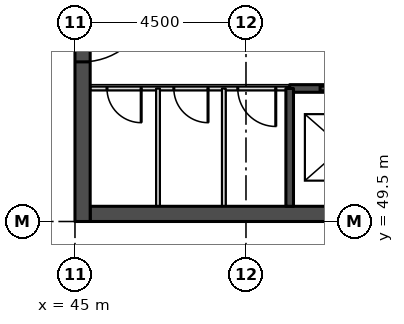
"""IFC4 building model, lengths in metres.
Left out: names, types, materials, properties, quantities, classifications, styles, units other than length and angle.
Written with IfcOpenShell. Run it as: python <this file> out.ifc"""

import sys

from ifc_helpers import new_model, si_unit, direction, frame, frame_2d, origin, place, context, subcontext, project, spatial, rectangle, extrude, element, fill, save


model = new_model("IFC4")
c1 = context("Model", 3, precision=1e-05, world=origin(), true_north=direction((0.0, 1.0)))
c2 = subcontext(c1, "Body", "Model", "MODEL_VIEW")
j1 = project(units=[si_unit("LENGTHUNIT", "METRE"), si_unit("PLANEANGLEUNIT", "RADIAN")], contexts=[c1])
p1 = place(None, origin())
s1 = spatial("IfcSite", under=j1, at=p1, CompositionType="ELEMENT")
p2 = place(p1, origin())
s2 = spatial("IfcBuilding", under=s1, at=p2, CompositionType="ELEMENT")
p3 = place(p2, frame((0.0, 0.0, 143.1)))
s3 = spatial("IfcBuildingStorey", under=s2, at=p3, CompositionType="ELEMENT", Elevation=143.1)
p4 = place(p3, frame((45.4, 49.7, 0.0), z_axis=(0.0, 0.0, 1.0), x_axis=(1.0, 0.0, 0.0)))
e1 = element("IfcWall", 1, at=p4, inside=s3, PredefinedType="SHEAR", context=c2, shape_type="SweptSolid", body=[
    extrude(rectangle(XDim=21.7, YDim=0.4, at=frame_2d((10.85, 0.0))), origin(), (0.0, 0.0, 1.0), 4.6),
])
p5 = place(p3, frame((45.2, 49.5, 0.0), z_axis=(0.0, 0.0, 1.0), x_axis=(0.0, 1.0, 0.0)))
e2 = element("IfcWall", 2, at=p5, inside=s3, PredefinedType="SHEAR", context=c2, shape_type="SweptSolid", body=[
    extrude(rectangle(XDim=22.5, YDim=0.4, at=frame_2d((11.25, 0.0))), origin(), (0.0, 0.0, 1.0), 4.6),
])
p6 = place(p5, frame((4.2, 0.0, 0.0)))
e3 = element("IfcOpeningElement", 3, at=p6, cuts=e2, PredefinedType="OPENING", context=c2, shape_type="SweptSolid", body=[
    extrude(rectangle(XDim=1.8, YDim=2.1, at=frame_2d((0.9, 1.05))), frame((0.0, 0.21, 0.0), z_axis=(0.0, -1.0, 0.0), x_axis=(1.0, 0.0, 0.0)), (0.0, 0.0, 1.0), 0.42),
])
p7 = place(p5, frame((6.9, 0.0, 0.0)))
e4 = element("IfcOpeningElement", 4, at=p7, cuts=e2, PredefinedType="OPENING", context=c2, shape_type="SweptSolid", body=[
    extrude(rectangle(XDim=1.1, YDim=2.1, at=frame_2d((0.55, 1.05))), frame((0.0, 0.21, 0.0), z_axis=(0.0, -1.0, 0.0), x_axis=(1.0, 0.0, 0.0)), (0.0, 0.0, 1.0), 0.42),
])
p8 = place(p5, frame((13.6, 0.0, 0.0)))
e5 = element("IfcOpeningElement", 5, at=p8, cuts=e2, PredefinedType="OPENING", context=c2, shape_type="SweptSolid", body=[
    extrude(rectangle(XDim=1.1, YDim=2.1, at=frame_2d((0.55, 1.05))), frame((0.0, 0.21, 0.0), z_axis=(0.0, -1.0, 0.0), x_axis=(1.0, 0.0, 0.0)), (0.0, 0.0, 1.0), 0.42),
])
p9 = place(p5, frame((16.5, 0.0, 0.0)))
e6 = element("IfcOpeningElement", 6, at=p9, cuts=e2, PredefinedType="OPENING", context=c2, shape_type="SweptSolid", body=[
    extrude(rectangle(XDim=1.8, YDim=2.1, at=frame_2d((0.9, 1.05))), frame((0.0, 0.21, 0.0), z_axis=(0.0, -1.0, 0.0), x_axis=(1.0, 0.0, 0.0)), (0.0, 0.0, 1.0), 0.42),
])
p10 = place(p3, frame((45.4, 53.0, 0.0), z_axis=(0.0, 0.0, 1.0), x_axis=(1.0, 0.0, 0.0)))
e7 = element("IfcWall", 7, at=p10, inside=s3, PredefinedType="PARTITIONING", context=c2, shape_type="SweptSolid", body=[
    extrude(rectangle(XDim=5.25, YDim=0.1, at=frame_2d((2.625, 0.0))), origin(), (0.0, 0.0, 1.0), 4.45),
])
p11 = place(p10, frame((0.442, 0.0, 0.0)))
e8 = element("IfcOpeningElement", 8, at=p11, cuts=e7, PredefinedType="OPENING", context=c2, shape_type="SweptSolid", body=[
    extrude(rectangle(XDim=0.9, YDim=2.1, at=frame_2d((0.45, 1.05))), frame((0.0, 0.06, 0.0), z_axis=(0.0, -1.0, 0.0), x_axis=(1.0, 0.0, 0.0)), (0.0, 0.0, 1.0), 0.12),
])
p12 = place(p10, frame((2.201, 0.0, 0.0)))
e9 = element("IfcOpeningElement", 9, at=p12, cuts=e7, PredefinedType="OPENING", context=c2, shape_type="SweptSolid", body=[
    extrude(rectangle(XDim=0.9, YDim=2.1, at=frame_2d((0.45, 1.05))), frame((0.0, 0.06, 0.0), z_axis=(0.0, -1.0, 0.0), x_axis=(1.0, 0.0, 0.0)), (0.0, 0.0, 1.0), 0.12),
])
p13 = place(p10, frame((3.884, 0.0, 0.0)))
e10 = element("IfcOpeningElement", 10, at=p13, cuts=e7, PredefinedType="OPENING", context=c2, shape_type="SweptSolid", body=[
    extrude(rectangle(XDim=1.0, YDim=2.1, at=frame_2d((0.5, 1.05))), frame((0.0, 0.06, 0.0), z_axis=(0.0, -1.0, 0.0), x_axis=(1.0, 0.0, 0.0)), (0.0, 0.0, 1.0), 0.12),
])
p14 = place(p3, frame((50.65, 53.0, 0.0), z_axis=(0.0, 0.0, 1.0), x_axis=(1.0, 0.0, 0.0)))
e11 = element("IfcWall", 11, at=p14, inside=s3, PredefinedType="SOLIDWALL", context=c2, shape_type="SweptSolid", body=[
    extrude(rectangle(XDim=11.2, YDim=0.2, at=frame_2d((5.6, 0.0))), origin(), (0.0, 0.0, 1.0), 4.45),
])
p15 = place(p14, frame((0.8, 0.0, 0.0)))
e12 = element("IfcOpeningElement", 12, at=p15, cuts=e11, PredefinedType="OPENING", context=c2, shape_type="SweptSolid", body=[
    extrude(rectangle(XDim=1.2, YDim=2.1, at=frame_2d((0.6, 1.05))), frame((0.0, 0.11, 0.0), z_axis=(0.0, -1.0, 0.0), x_axis=(1.0, 0.0, 0.0)), (0.0, 0.0, 1.0), 0.22),
])
p16 = place(p14, frame((3.6, 0.0, 0.0)))
e13 = element("IfcOpeningElement", 13, at=p16, cuts=e11, PredefinedType="OPENING", context=c2, shape_type="SweptSolid", body=[
    extrude(rectangle(XDim=1.2, YDim=2.1, at=frame_2d((0.6, 1.05))), frame((0.0, 0.11, 0.0), z_axis=(0.0, -1.0, 0.0), x_axis=(1.0, 0.0, 0.0)), (0.0, 0.0, 1.0), 0.22),
])
p17 = place(p14, frame((6.4, 0.0, 0.0)))
e14 = element("IfcOpeningElement", 14, at=p17, cuts=e11, PredefinedType="OPENING", context=c2, shape_type="SweptSolid", body=[
    extrude(rectangle(XDim=1.2, YDim=2.1, at=frame_2d((0.6, 1.05))), frame((0.0, 0.11, 0.0), z_axis=(0.0, -1.0, 0.0), x_axis=(1.0, 0.0, 0.0)), (0.0, 0.0, 1.0), 0.22),
])
p18 = place(p14, frame((9.2, 0.0, 0.0)))
e15 = element("IfcOpeningElement", 15, at=p18, cuts=e11, PredefinedType="OPENING", context=c2, shape_type="SweptSolid", body=[
    extrude(rectangle(XDim=1.2, YDim=2.1, at=frame_2d((0.6, 1.05))), frame((0.0, 0.11, 0.0), z_axis=(0.0, -1.0, 0.0), x_axis=(1.0, 0.0, 0.0)), (0.0, 0.0, 1.0), 0.22),
])
for number, where, z_axis, x_axis in (
    (16, (47.185, 49.9, 0.0), (0.0, 0.0, 1.0), (0.0, 1.0, 0.0)),
    (17, (48.917, 49.9, 0.0), (0.0, 0.0, 1.0), (0.0, 1.0, 0.0)),
):
    element("IfcWall", number, at=place(p3, frame(where, z_axis=z_axis, x_axis=x_axis)), inside=s3, PredefinedType="PARTITIONING", context=c2, shape_type="SweptSolid", body=[
        extrude(rectangle(XDim=3.1, YDim=0.1, at=frame_2d((1.55, 0.0))), origin(), (0.0, 0.0, 1.0), 4.45),
    ])
p19 = place(p3, frame((50.65, 49.9, 0.0), z_axis=(0.0, 0.0, 1.0), x_axis=(0.0, 1.0, 0.0)))
e18 = element("IfcWall", 18, at=p19, inside=s3, PredefinedType="SOLIDWALL", context=c2, shape_type="SweptSolid", body=[
    extrude(rectangle(XDim=3.1, YDim=0.2, at=frame_2d((1.55, 0.0))), origin(), (0.0, 0.0, 1.0), 4.45),
])
p20 = place(p15, origin())
e19 = element("IfcDoor", 19, at=p20, inside=s3, OperationType="DOUBLE_DOOR_SLIDING", PredefinedType="DOOR", context=c2, shape_type="SweptSolid", body=[
    extrude(rectangle(XDim=1.2, YDim=2.1, at=frame_2d((0.6, 1.05))), frame((0.0, 0.025, 0.0), z_axis=(0.0, -1.0, 0.0), x_axis=(1.0, 0.0, 0.0)), (0.0, 0.0, 1.0), 0.05),
])
fill(e12, e19)
p21 = place(p6, frame((1.8, 0.0, 0.0), z_axis=(0.0, 0.0, 1.0), x_axis=(-1.0, 0.0, 0.0)))
e20 = element("IfcDoor", 20, at=p21, inside=s3, OperationType="SINGLE_SWING_LEFT", PredefinedType="DOOR", context=c2, shape_type="SweptSolid", body=[
    extrude(rectangle(XDim=1.8, YDim=2.1, at=frame_2d((0.9, 1.05))), frame((0.0, 0.025, 0.0), z_axis=(0.0, -1.0, 0.0), x_axis=(1.0, 0.0, 0.0)), (0.0, 0.0, 1.0), 0.05),
])
fill(e3, e20)
p22 = place(p11, frame((0.9, 0.0, 0.0), z_axis=(0.0, 0.0, 1.0), x_axis=(-1.0, 0.0, 0.0)))
e21 = element("IfcDoor", 21, at=p22, inside=s3, OperationType="SINGLE_SWING_LEFT", PredefinedType="DOOR", context=c2, shape_type="SweptSolid", body=[
    extrude(rectangle(XDim=0.9, YDim=2.1, at=frame_2d((0.45, 1.05))), frame((0.0, 0.025, 0.0), z_axis=(0.0, -1.0, 0.0), x_axis=(1.0, 0.0, 0.0)), (0.0, 0.0, 1.0), 0.05),
])
fill(e8, e21)
p23 = place(p12, frame((0.9, 0.0, 0.0), z_axis=(0.0, 0.0, 1.0), x_axis=(-1.0, 0.0, 0.0)))
e22 = element("IfcDoor", 22, at=p23, inside=s3, OperationType="SINGLE_SWING_LEFT", PredefinedType="DOOR", context=c2, shape_type="SweptSolid", body=[
    extrude(rectangle(XDim=0.9, YDim=2.1, at=frame_2d((0.45, 1.05))), frame((0.0, 0.025, 0.0), z_axis=(0.0, -1.0, 0.0), x_axis=(1.0, 0.0, 0.0)), (0.0, 0.0, 1.0), 0.05),
])
fill(e9, e22)
p24 = place(p13, frame((1.0, 0.0, 0.0), z_axis=(0.0, 0.0, 1.0), x_axis=(-1.0, 0.0, 0.0)))
e23 = element("IfcDoor", 23, at=p24, inside=s3, OperationType="SINGLE_SWING_LEFT", PredefinedType="DOOR", context=c2, shape_type="SweptSolid", body=[
    extrude(rectangle(XDim=1.0, YDim=2.1, at=frame_2d((0.5, 1.05))), frame((0.0, 0.025, 0.0), z_axis=(0.0, -1.0, 0.0), x_axis=(1.0, 0.0, 0.0)), (0.0, 0.0, 1.0), 0.05),
])
fill(e10, e23)
save(model, sys.argv[1])
